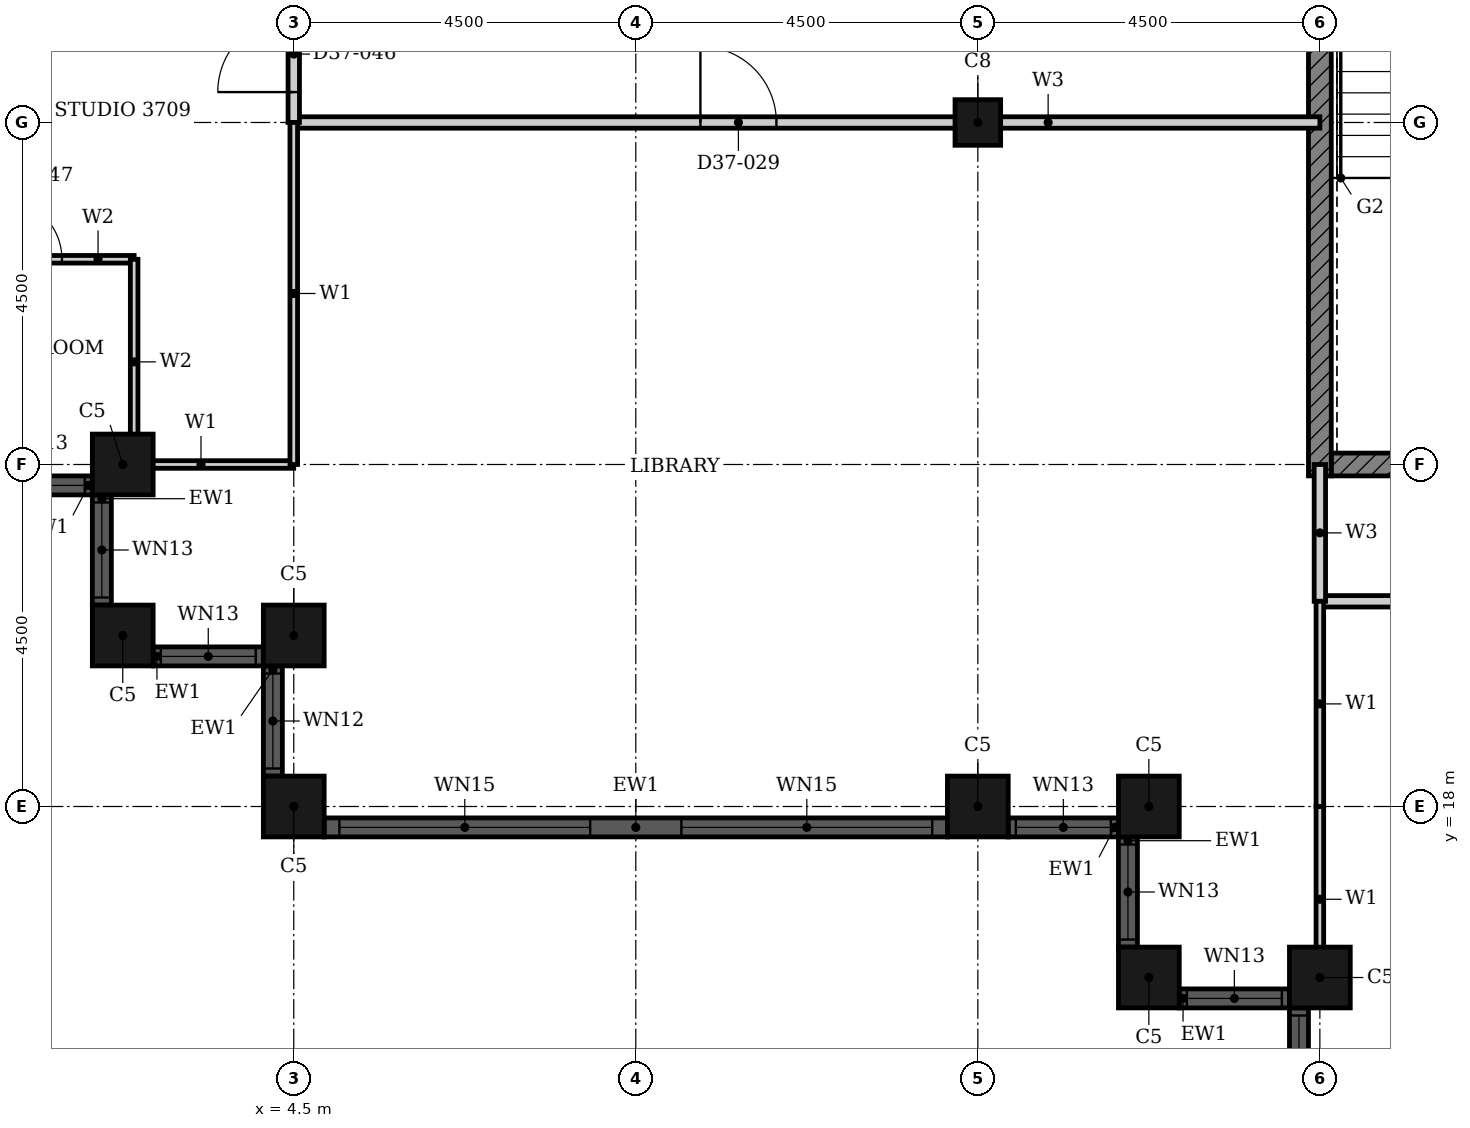
"""IFC4 building model, lengths in metres.
Left out: names, types, materials, properties, quantities, classifications, styles, units other than length and angle.
Written with IfcOpenShell. Run it as: python <this file> out.ifc"""

import sys

from ifc_helpers import new_model, si_unit, direction, frame, frame_2d, origin, origin_2d, place, context, subcontext, project, spatial, rectangle, hollow_rectangle, extrude, element, fill, save


model = new_model("IFC4")
c1 = context("Model", 3, precision=1e-05, world=origin(), true_north=direction((0.0, 1.0)))
c2 = subcontext(c1, "Body", "Model", "MODEL_VIEW")
j1 = project(units=[si_unit("LENGTHUNIT", "METRE"), si_unit("PLANEANGLEUNIT", "RADIAN")], contexts=[c1])
p1 = place(None, origin())
s1 = spatial("IfcSite", under=j1, at=p1, CompositionType="ELEMENT")
p2 = place(p1, origin())
s2 = spatial("IfcBuilding", under=s1, at=p2, CompositionType="ELEMENT")
p3 = place(p2, frame((0.0, 0.0, 150.6)))
s3 = spatial("IfcBuildingStorey", under=s2, at=p3, CompositionType="ELEMENT", Elevation=150.6)
for number, where, z_axis, x_axis in (
    (1, (2.25, 22.5, 0.0), (0.0, 0.0, 1.0), (1.0, 0.0, 0.0)),
    (2, (2.25, 20.25, 0.0), (0.0, 0.0, 1.0), (1.0, 0.0, 0.0)),
    (3, (4.5, 20.25, 0.0), (0.0, 0.0, 1.0), (1.0, 0.0, 0.0)),
    (4, (4.5, 18.0, 0.0), (0.0, 0.0, 1.0), (1.0, 0.0, 0.0)),
    (5, (13.5, 18.0, 0.0), (0.0, 0.0, 1.0), (1.0, 0.0, 0.0)),
    (6, (15.75, 18.0, 0.0), (0.0, 0.0, 1.0), (1.0, 0.0, 0.0)),
    (7, (15.75, 15.75, 0.0), (0.0, 0.0, 1.0), (1.0, 0.0, 0.0)),
    (8, (18.0, 15.75, 0.0), (0.0, 0.0, 1.0), (1.0, 0.0, 0.0)),
):
    element("IfcColumn", number, at=place(p3, frame(where, z_axis=z_axis, x_axis=x_axis)), inside=s3, PredefinedType="COLUMN", context=c2, shape_type="SweptSolid", body=[
        extrude(hollow_rectangle(XDim=0.8, YDim=0.8, WallThickness=0.025, at=origin_2d()), origin(), (0.0, 0.0, 1.0), 3.7),
    ])
p4 = place(p3, frame((13.5, 27.0, 0.0), z_axis=(0.0, 0.0, 1.0), x_axis=(1.0, 0.0, 0.0)))
e9 = element("IfcColumn", 9, at=p4, inside=s3, PredefinedType="COLUMN", context=c2, shape_type="SweptSolid", body=[
    extrude(hollow_rectangle(XDim=0.6, YDim=0.6, WallThickness=0.02, at=origin_2d()), origin(), (0.0, 0.0, 1.0), 3.7),
])
p5 = place(p3, frame((0.4, 22.225, 0.0), z_axis=(0.0, 0.0, 1.0), x_axis=(1.0, 0.0, 0.0)))
e10 = element("IfcWall", 10, at=p5, inside=s3, PredefinedType="SOLIDWALL", context=c2, shape_type="SweptSolid", body=[
    extrude(rectangle(XDim=1.45, YDim=0.25, at=frame_2d((0.725, 0.0))), origin(), (0.0, 0.0, 1.0), 3.7),
])
p6 = place(p5, frame((0.1, 0.0, 0.9)))
e11 = element("IfcOpeningElement", 11, at=p6, cuts=e10, PredefinedType="OPENING", context=c2, shape_type="SweptSolid", body=[
    extrude(rectangle(XDim=1.25, YDim=1.85, at=frame_2d((0.625, 0.925))), frame((0.0, 0.135, 0.0), z_axis=(0.0, -1.0, 0.0), x_axis=(1.0, 0.0, 0.0)), (0.0, 0.0, 1.0), 0.27),
])
p7 = place(p3, frame((1.975, 22.1, 0.0), z_axis=(0.0, 0.0, 1.0), x_axis=(0.0, -1.0, 0.0)))
e12 = element("IfcWall", 12, at=p7, inside=s3, PredefinedType="SOLIDWALL", context=c2, shape_type="SweptSolid", body=[
    extrude(rectangle(XDim=1.45, YDim=0.25, at=frame_2d((0.725, 0.0))), origin(), (0.0, 0.0, 1.0), 3.7),
])
p8 = place(p7, frame((0.1, 0.0, 0.9)))
e13 = element("IfcOpeningElement", 13, at=p8, cuts=e12, PredefinedType="OPENING", context=c2, shape_type="SweptSolid", body=[
    extrude(rectangle(XDim=1.25, YDim=1.85, at=frame_2d((0.625, 0.925))), frame((0.0, 0.135, 0.0), z_axis=(0.0, -1.0, 0.0), x_axis=(1.0, 0.0, 0.0)), (0.0, 0.0, 1.0), 0.27),
])
p9 = place(p3, frame((2.65, 19.975, 0.0), z_axis=(0.0, 0.0, 1.0), x_axis=(1.0, 0.0, 0.0)))
e14 = element("IfcWall", 14, at=p9, inside=s3, PredefinedType="SOLIDWALL", context=c2, shape_type="SweptSolid", body=[
    extrude(rectangle(XDim=1.45, YDim=0.25, at=frame_2d((0.725, 0.0))), origin(), (0.0, 0.0, 1.0), 3.7),
])
p10 = place(p9, frame((0.1, 0.0, 0.9)))
e15 = element("IfcOpeningElement", 15, at=p10, cuts=e14, PredefinedType="OPENING", context=c2, shape_type="SweptSolid", body=[
    extrude(rectangle(XDim=1.25, YDim=1.85, at=frame_2d((0.625, 0.925))), frame((0.0, 0.135, 0.0), z_axis=(0.0, -1.0, 0.0), x_axis=(1.0, 0.0, 0.0)), (0.0, 0.0, 1.0), 0.27),
])
p11 = place(p3, frame((4.225, 19.85, 0.0), z_axis=(0.0, 0.0, 1.0), x_axis=(0.0, -1.0, 0.0)))
e16 = element("IfcWall", 16, at=p11, inside=s3, PredefinedType="SOLIDWALL", context=c2, shape_type="SweptSolid", body=[
    extrude(rectangle(XDim=1.45, YDim=0.25, at=frame_2d((0.725, 0.0))), origin(), (0.0, 0.0, 1.0), 3.7),
])
p12 = place(p11, frame((0.1, 0.0, 0.9)))
e17 = element("IfcOpeningElement", 17, at=p12, cuts=e16, PredefinedType="OPENING", context=c2, shape_type="SweptSolid", body=[
    extrude(rectangle(XDim=1.25, YDim=2.08, at=frame_2d((0.625, 1.04))), frame((0.0, 0.135, 0.0), z_axis=(0.0, -1.0, 0.0), x_axis=(1.0, 0.0, 0.0)), (0.0, 0.0, 1.0), 0.27),
])
p13 = place(p3, frame((4.9, 17.725, 0.0), z_axis=(0.0, 0.0, 1.0), x_axis=(1.0, 0.0, 0.0)))
e18 = element("IfcWall", 18, at=p13, inside=s3, PredefinedType="SOLIDWALL", context=c2, shape_type="SweptSolid", body=[
    extrude(rectangle(XDim=8.2, YDim=0.25, at=frame_2d((4.1, 0.0))), origin(), (0.0, 0.0, 1.0), 3.7),
])
p14 = place(p13, frame((0.2, 0.0, 0.45)))
e19 = element("IfcOpeningElement", 19, at=p14, cuts=e18, PredefinedType="OPENING", context=c2, shape_type="SweptSolid", body=[
    extrude(rectangle(XDim=3.3, YDim=2.3, at=frame_2d((1.65, 1.15))), frame((0.0, 0.135, 0.0), z_axis=(0.0, -1.0, 0.0), x_axis=(1.0, 0.0, 0.0)), (0.0, 0.0, 1.0), 0.27),
])
p15 = place(p13, frame((4.7, 0.0, 0.45)))
e20 = element("IfcOpeningElement", 20, at=p15, cuts=e18, PredefinedType="OPENING", context=c2, shape_type="SweptSolid", body=[
    extrude(rectangle(XDim=3.3, YDim=2.3, at=frame_2d((1.65, 1.15))), frame((0.0, 0.135, 0.0), z_axis=(0.0, -1.0, 0.0), x_axis=(1.0, 0.0, 0.0)), (0.0, 0.0, 1.0), 0.27),
])
p16 = place(p3, frame((13.9, 17.725, 0.0), z_axis=(0.0, 0.0, 1.0), x_axis=(1.0, 0.0, 0.0)))
e21 = element("IfcWall", 21, at=p16, inside=s3, PredefinedType="SOLIDWALL", context=c2, shape_type="SweptSolid", body=[
    extrude(rectangle(XDim=1.45, YDim=0.25, at=frame_2d((0.725, 0.0))), origin(), (0.0, 0.0, 1.0), 3.7),
])
p17 = place(p16, frame((0.1, 0.0, 0.9)))
e22 = element("IfcOpeningElement", 22, at=p17, cuts=e21, PredefinedType="OPENING", context=c2, shape_type="SweptSolid", body=[
    extrude(rectangle(XDim=1.25, YDim=1.85, at=frame_2d((0.625, 0.925))), frame((0.0, 0.135, 0.0), z_axis=(0.0, -1.0, 0.0), x_axis=(1.0, 0.0, 0.0)), (0.0, 0.0, 1.0), 0.27),
])
p18 = place(p3, frame((15.475, 17.6, 0.0), z_axis=(0.0, 0.0, 1.0), x_axis=(0.0, -1.0, 0.0)))
e23 = element("IfcWall", 23, at=p18, inside=s3, PredefinedType="SOLIDWALL", context=c2, shape_type="SweptSolid", body=[
    extrude(rectangle(XDim=1.45, YDim=0.25, at=frame_2d((0.725, 0.0))), origin(), (0.0, 0.0, 1.0), 3.7),
])
p19 = place(p18, frame((0.1, 0.0, 0.9)))
e24 = element("IfcOpeningElement", 24, at=p19, cuts=e23, PredefinedType="OPENING", context=c2, shape_type="SweptSolid", body=[
    extrude(rectangle(XDim=1.25, YDim=1.85, at=frame_2d((0.625, 0.925))), frame((0.0, 0.135, 0.0), z_axis=(0.0, -1.0, 0.0), x_axis=(1.0, 0.0, 0.0)), (0.0, 0.0, 1.0), 0.27),
])
p20 = place(p3, frame((16.15, 15.475, 0.0), z_axis=(0.0, 0.0, 1.0), x_axis=(1.0, 0.0, 0.0)))
e25 = element("IfcWall", 25, at=p20, inside=s3, PredefinedType="SOLIDWALL", context=c2, shape_type="SweptSolid", body=[
    extrude(rectangle(XDim=1.45, YDim=0.25, at=frame_2d((0.725, 0.0))), origin(), (0.0, 0.0, 1.0), 3.7),
])
p21 = place(p20, frame((0.1, 0.0, 0.9)))
e26 = element("IfcOpeningElement", 26, at=p21, cuts=e25, PredefinedType="OPENING", context=c2, shape_type="SweptSolid", body=[
    extrude(rectangle(XDim=1.25, YDim=1.85, at=frame_2d((0.625, 0.925))), frame((0.0, 0.135, 0.0), z_axis=(0.0, -1.0, 0.0), x_axis=(1.0, 0.0, 0.0)), (0.0, 0.0, 1.0), 0.27),
])
p22 = place(p3, frame((17.725, 15.35, 0.0), z_axis=(0.0, 0.0, 1.0), x_axis=(0.0, -1.0, 0.0)))
e27 = element("IfcWall", 27, at=p22, inside=s3, PredefinedType="SOLIDWALL", context=c2, shape_type="SweptSolid", body=[
    extrude(rectangle(XDim=1.45, YDim=0.25, at=frame_2d((0.725, 0.0))), origin(), (0.0, 0.0, 1.0), 3.7),
])
p23 = place(p22, frame((0.1, 0.0, 0.9)))
e28 = element("IfcOpeningElement", 28, at=p23, cuts=e27, PredefinedType="OPENING", context=c2, shape_type="SweptSolid", body=[
    extrude(rectangle(XDim=1.25, YDim=1.85, at=frame_2d((0.625, 0.925))), frame((0.0, 0.135, 0.0), z_axis=(0.0, -1.0, 0.0), x_axis=(1.0, 0.0, 0.0)), (0.0, 0.0, 1.0), 0.27),
])
p24 = place(p3, frame((18.15, 22.5, 0.0), z_axis=(0.0, 0.0, 1.0), x_axis=(1.0, 0.0, 0.0)))
e29 = element("IfcWall", 29, at=p24, inside=s3, PredefinedType="SHEAR", context=c2, shape_type="SweptSolid", body=[
    extrude(rectangle(XDim=4.225, YDim=0.3, at=frame_2d((2.113, 0.0))), origin(), (0.0, 0.0, 1.0), 3.4),
])
p25 = place(p3, frame((18.0, 22.35, 0.0), z_axis=(0.0, 0.0, 1.0), x_axis=(0.0, 1.0, 0.0)))
e30 = element("IfcWall", 30, at=p25, inside=s3, PredefinedType="SHEAR", context=c2, shape_type="SweptSolid", body=[
    extrude(rectangle(XDim=9.3, YDim=0.3, at=frame_2d((4.65, 0.0))), origin(), (0.0, 0.0, 1.0), 3.4),
])
p26 = place(p3, frame((18.0, 20.7, 0.0), z_axis=(0.0, 0.0, 1.0), x_axis=(1.0, 0.0, 0.0)))
e31 = element("IfcWall", 31, at=p26, inside=s3, PredefinedType="PARTITIONING", context=c2, shape_type="SweptSolid", body=[
    extrude(rectangle(XDim=13.5, YDim=0.15, at=frame_2d((6.75, 0.0))), origin(), (0.0, 0.0, 1.0), 3.4),
])
p27 = place(p26, frame((6.25, 0.0, 0.0)))
e32 = element("IfcOpeningElement", 32, at=p27, cuts=e31, PredefinedType="OPENING", context=c2, shape_type="SweptSolid", body=[
    extrude(rectangle(XDim=1.0, YDim=2.1, at=frame_2d((0.5, 1.05))), frame((0.0, 0.085, 0.0), z_axis=(0.0, -1.0, 0.0), x_axis=(1.0, 0.0, 0.0)), (0.0, 0.0, 1.0), 0.17),
])
p28 = place(p3, frame((4.5, 27.0, 0.0), z_axis=(0.0, 0.0, 1.0), x_axis=(1.0, 0.0, 0.0)))
e33 = element("IfcWall", 33, at=p28, inside=s3, PredefinedType="PARTITIONING", context=c2, shape_type="SweptSolid", body=[
    extrude(rectangle(XDim=13.5, YDim=0.15, at=frame_2d((6.75, 0.0))), origin(), (0.0, 0.0, 1.0), 2.68),
])
p29 = place(p28, frame((5.35, 0.0, 0.0)))
e34 = element("IfcOpeningElement", 34, at=p29, cuts=e33, PredefinedType="OPENING", context=c2, shape_type="SweptSolid", body=[
    extrude(rectangle(XDim=1.0, YDim=2.1, at=frame_2d((0.5, 1.05))), frame((0.0, 0.085, 0.0), z_axis=(0.0, -1.0, 0.0), x_axis=(1.0, 0.0, 0.0)), (0.0, 0.0, 1.0), 0.17),
])
p30 = place(p3, frame((18.0, 20.7, 0.0), z_axis=(0.0, 0.0, 1.0), x_axis=(0.0, 1.0, 0.0)))
e35 = element("IfcWall", 35, at=p30, inside=s3, PredefinedType="PARTITIONING", context=c2, shape_type="SweptSolid", body=[
    extrude(rectangle(XDim=1.8, YDim=0.15, at=frame_2d((0.9, 0.0))), origin(), (0.0, 0.0, 1.0), 3.4),
])
p31 = place(p3, frame((4.5, 27.0, 0.0), z_axis=(0.0, 0.0, 1.0), x_axis=(0.0, 1.0, 0.0)))
e36 = element("IfcWall", 36, at=p31, inside=s3, PredefinedType="PARTITIONING", context=c2, shape_type="SweptSolid", body=[
    extrude(rectangle(XDim=1.8, YDim=0.15, at=frame_2d((0.9, 0.0))), origin(), (0.0, 0.0, 1.0), 3.4),
])
p32 = place(p31, frame((0.4, 0.0, 0.0)))
e37 = element("IfcOpeningElement", 37, at=p32, cuts=e36, PredefinedType="OPENING", context=c2, shape_type="SweptSolid", body=[
    extrude(rectangle(XDim=1.0, YDim=2.2, at=frame_2d((0.5, 1.1))), frame((0.0, 0.085, 0.0), z_axis=(0.0, -1.0, 0.0), x_axis=(1.0, 0.0, 0.0)), (0.0, 0.0, 1.0), 0.17),
])
p33 = place(p3, frame((2.06, 22.5, 0.0), z_axis=(0.0, 0.0, 1.0), x_axis=(1.0, 0.0, 0.0)))
e38 = element("IfcWall", 38, at=p33, inside=s3, PredefinedType="PARTITIONING", context=c2, shape_type="SweptSolid", body=[
    extrude(rectangle(XDim=2.439, YDim=0.1, at=frame_2d((1.219, 0.0))), origin(), (0.0, 0.0, 1.0), 2.68),
])
p34 = place(p3, frame((18.0, 15.56, 0.0), z_axis=(0.0, 0.0, 1.0), x_axis=(0.0, 1.0, 0.0)))
e39 = element("IfcWall", 39, at=p34, inside=s3, PredefinedType="PARTITIONING", context=c2, shape_type="SweptSolid", body=[
    extrude(rectangle(XDim=2.439, YDim=0.1, at=frame_2d((1.219, 0.0))), origin(), (0.0, 0.0, 1.0), 3.4),
])
p35 = place(p3, frame((18.0, 18.0, 0.0), z_axis=(0.0, 0.0, 1.0), x_axis=(0.0, 1.0, 0.0)))
e40 = element("IfcWall", 40, at=p35, inside=s3, PredefinedType="PARTITIONING", context=c2, shape_type="SweptSolid", body=[
    extrude(rectangle(XDim=2.7, YDim=0.1, at=frame_2d((1.35, 0.0))), origin(), (0.0, 0.0, 1.0), 3.4),
])
p36 = place(p3, frame((4.5, 22.5, 0.0), z_axis=(0.0, 0.0, 1.0), x_axis=(0.0, 1.0, 0.0)))
e41 = element("IfcWall", 41, at=p36, inside=s3, PredefinedType="PARTITIONING", context=c2, shape_type="SweptSolid", body=[
    extrude(rectangle(XDim=4.5, YDim=0.1, at=frame_2d((2.25, 0.0))), origin(), (0.0, 0.0, 1.0), 3.4),
])
p37 = place(p3, frame((-0.15, 25.2, 0.0), z_axis=(0.0, 0.0, 1.0), x_axis=(1.0, 0.0, 0.0)))
e42 = element("IfcWall", 42, at=p37, inside=s3, PredefinedType="PARTITIONING", context=c2, shape_type="SweptSolid", body=[
    extrude(rectangle(XDim=2.55, YDim=0.1, at=frame_2d((1.275, 0.0))), origin(), (0.0, 0.0, 1.0), 3.4),
])
p38 = place(p37, frame((0.8, 0.0, 0.0)))
e43 = element("IfcOpeningElement", 43, at=p38, cuts=e42, PredefinedType="OPENING", context=c2, shape_type="SweptSolid", body=[
    extrude(rectangle(XDim=0.8, YDim=2.1, at=frame_2d((0.4, 1.05))), frame((0.0, 0.06, 0.0), z_axis=(0.0, -1.0, 0.0), x_axis=(1.0, 0.0, 0.0)), (0.0, 0.0, 1.0), 0.12),
])
p39 = place(p3, frame((2.4, 22.5, 0.0), z_axis=(0.0, 0.0, 1.0), x_axis=(0.0, 1.0, 0.0)))
e44 = element("IfcWall", 44, at=p39, inside=s3, PredefinedType="PARTITIONING", context=c2, shape_type="SweptSolid", body=[
    extrude(rectangle(XDim=2.7, YDim=0.1, at=frame_2d((1.35, 0.0))), origin(), (0.0, 0.0, 1.0), 3.4),
])
p40 = place(p6, origin())
e45 = element("IfcWindow", 45, at=p40, inside=s3, PartitioningType="SINGLE_PANEL", PredefinedType="WINDOW", context=c2, shape_type="SweptSolid", body=[
    extrude(rectangle(XDim=1.25, YDim=1.85, at=frame_2d((0.625, 0.925))), frame((0.0, 0.03, 0.0), z_axis=(0.0, -1.0, 0.0), x_axis=(1.0, 0.0, 0.0)), (0.0, 0.0, 1.0), 0.06),
])
fill(e11, e45)
p41 = place(p8, origin())
e46 = element("IfcWindow", 46, at=p41, inside=s3, PartitioningType="SINGLE_PANEL", PredefinedType="WINDOW", context=c2, shape_type="SweptSolid", body=[
    extrude(rectangle(XDim=1.25, YDim=1.85, at=frame_2d((0.625, 0.925))), frame((0.0, 0.03, 0.0), z_axis=(0.0, -1.0, 0.0), x_axis=(1.0, 0.0, 0.0)), (0.0, 0.0, 1.0), 0.06),
])
fill(e13, e46)
p42 = place(p10, origin())
e47 = element("IfcWindow", 47, at=p42, inside=s3, PartitioningType="SINGLE_PANEL", PredefinedType="WINDOW", context=c2, shape_type="SweptSolid", body=[
    extrude(rectangle(XDim=1.25, YDim=1.85, at=frame_2d((0.625, 0.925))), frame((0.0, 0.03, 0.0), z_axis=(0.0, -1.0, 0.0), x_axis=(1.0, 0.0, 0.0)), (0.0, 0.0, 1.0), 0.06),
])
fill(e15, e47)
p43 = place(p12, origin())
e48 = element("IfcWindow", 48, at=p43, inside=s3, PartitioningType="SINGLE_PANEL", PredefinedType="WINDOW", context=c2, shape_type="SweptSolid", body=[
    extrude(rectangle(XDim=1.25, YDim=2.08, at=frame_2d((0.625, 1.04))), frame((0.0, 0.03, 0.0), z_axis=(0.0, -1.0, 0.0), x_axis=(1.0, 0.0, 0.0)), (0.0, 0.0, 1.0), 0.06),
])
fill(e17, e48)
p44 = place(p14, origin())
e49 = element("IfcWindow", 49, at=p44, inside=s3, PartitioningType="SINGLE_PANEL", PredefinedType="WINDOW", context=c2, shape_type="SweptSolid", body=[
    extrude(rectangle(XDim=3.3, YDim=2.3, at=frame_2d((1.65, 1.15))), frame((0.0, 0.03, 0.0), z_axis=(0.0, -1.0, 0.0), x_axis=(1.0, 0.0, 0.0)), (0.0, 0.0, 1.0), 0.06),
])
fill(e19, e49)
p45 = place(p15, origin())
e50 = element("IfcWindow", 50, at=p45, inside=s3, PartitioningType="SINGLE_PANEL", PredefinedType="WINDOW", context=c2, shape_type="SweptSolid", body=[
    extrude(rectangle(XDim=3.3, YDim=2.3, at=frame_2d((1.65, 1.15))), frame((0.0, 0.03, 0.0), z_axis=(0.0, -1.0, 0.0), x_axis=(1.0, 0.0, 0.0)), (0.0, 0.0, 1.0), 0.06),
])
fill(e20, e50)
p46 = place(p17, origin())
e51 = element("IfcWindow", 51, at=p46, inside=s3, PartitioningType="SINGLE_PANEL", PredefinedType="WINDOW", context=c2, shape_type="SweptSolid", body=[
    extrude(rectangle(XDim=1.25, YDim=1.85, at=frame_2d((0.625, 0.925))), frame((0.0, 0.03, 0.0), z_axis=(0.0, -1.0, 0.0), x_axis=(1.0, 0.0, 0.0)), (0.0, 0.0, 1.0), 0.06),
])
fill(e22, e51)
p47 = place(p19, origin())
e52 = element("IfcWindow", 52, at=p47, inside=s3, PartitioningType="SINGLE_PANEL", PredefinedType="WINDOW", context=c2, shape_type="SweptSolid", body=[
    extrude(rectangle(XDim=1.25, YDim=1.85, at=frame_2d((0.625, 0.925))), frame((0.0, 0.03, 0.0), z_axis=(0.0, -1.0, 0.0), x_axis=(1.0, 0.0, 0.0)), (0.0, 0.0, 1.0), 0.06),
])
fill(e24, e52)
p48 = place(p21, origin())
e53 = element("IfcWindow", 53, at=p48, inside=s3, PartitioningType="SINGLE_PANEL", PredefinedType="WINDOW", context=c2, shape_type="SweptSolid", body=[
    extrude(rectangle(XDim=1.25, YDim=1.85, at=frame_2d((0.625, 0.925))), frame((0.0, 0.03, 0.0), z_axis=(0.0, -1.0, 0.0), x_axis=(1.0, 0.0, 0.0)), (0.0, 0.0, 1.0), 0.06),
])
fill(e26, e53)
p49 = place(p23, origin())
e54 = element("IfcWindow", 54, at=p49, inside=s3, PartitioningType="SINGLE_PANEL", PredefinedType="WINDOW", context=c2, shape_type="SweptSolid", body=[
    extrude(rectangle(XDim=1.25, YDim=1.85, at=frame_2d((0.625, 0.925))), frame((0.0, 0.03, 0.0), z_axis=(0.0, -1.0, 0.0), x_axis=(1.0, 0.0, 0.0)), (0.0, 0.0, 1.0), 0.06),
])
fill(e28, e54)
p50 = place(p29, origin())
e55 = element("IfcDoor", 55, at=p50, inside=s3, OperationType="SINGLE_SWING_LEFT", PredefinedType="DOOR", context=c2, shape_type="SweptSolid", body=[
    extrude(rectangle(XDim=1.0, YDim=2.1, at=frame_2d((0.5, 1.05))), frame((0.0, 0.025, 0.0), z_axis=(0.0, -1.0, 0.0), x_axis=(1.0, 0.0, 0.0)), (0.0, 0.0, 1.0), 0.05),
])
fill(e34, e55)
p51 = place(p32, origin())
e56 = element("IfcDoor", 56, at=p51, inside=s3, OperationType="SINGLE_SWING_RIGHT", PredefinedType="DOOR", context=c2, shape_type="SweptSolid", body=[
    extrude(rectangle(XDim=1.0, YDim=2.2, at=frame_2d((0.5, 1.1))), frame((0.0, 0.025, 0.0), z_axis=(0.0, -1.0, 0.0), x_axis=(1.0, 0.0, 0.0)), (0.0, 0.0, 1.0), 0.05),
])
fill(e37, e56)
p52 = place(p38, origin())
e57 = element("IfcDoor", 57, at=p52, inside=s3, OperationType="SINGLE_SWING_RIGHT", PredefinedType="DOOR", context=c2, shape_type="SweptSolid", body=[
    extrude(rectangle(XDim=0.8, YDim=2.1, at=frame_2d((0.4, 1.05))), frame((0.0, 0.025, 0.0), z_axis=(0.0, -1.0, 0.0), x_axis=(1.0, 0.0, 0.0)), (0.0, 0.0, 1.0), 0.05),
])
fill(e43, e57)
save(model, sys.argv[1])
